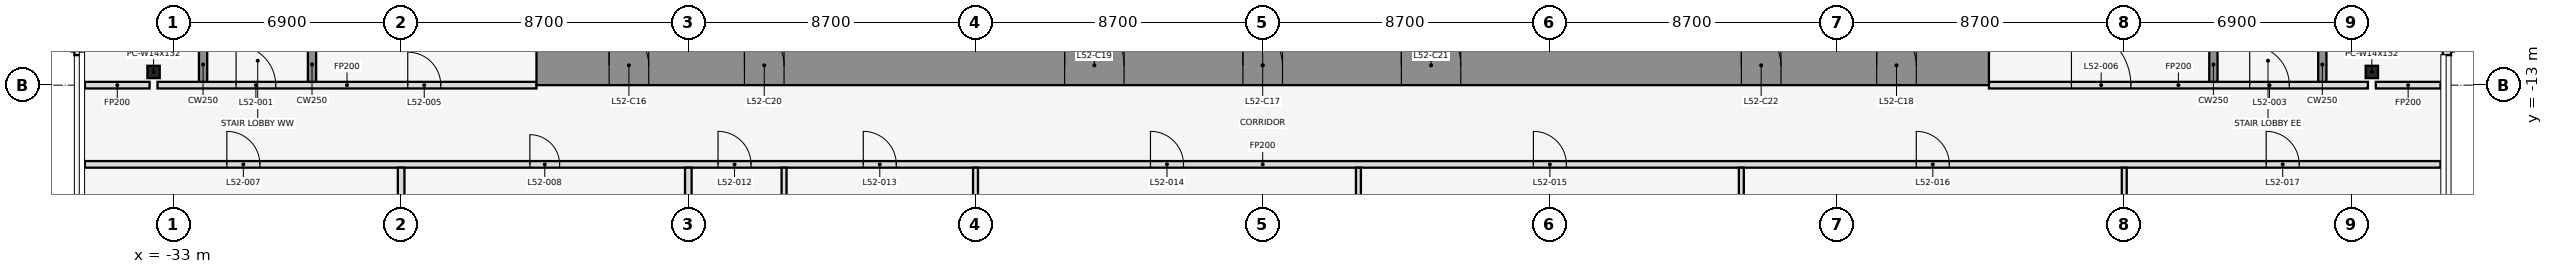
"""IFC4 building model, lengths in metres.
Left out: names, types, materials, properties, quantities, classifications, styles, units other than length and angle.
Written with IfcOpenShell. Run it as: python <this file> out.ifc"""

import sys

from ifc_helpers import new_model, si_unit, direction, frame, frame_2d, origin, origin_2d, place, context, subcontext, project, spatial, rectangle, i_section, extrude, element, fill, save


model = new_model("IFC4")
c1 = context("Model", 3, precision=1e-05, world=origin(), true_north=direction((0.0, 1.0)))
c2 = subcontext(c1, "Body", "Model", "MODEL_VIEW")
j1 = project(units=[si_unit("LENGTHUNIT", "METRE"), si_unit("PLANEANGLEUNIT", "RADIAN")], contexts=[c1])
p1 = place(None, origin())
s1 = spatial("IfcSite", under=j1, at=p1, CompositionType="ELEMENT")
p2 = place(p1, origin())
s2 = spatial("IfcBuilding", under=s1, at=p2, CompositionType="ELEMENT")
p3 = place(p2, frame((0.0, 0.0, 231.9)))
s3 = spatial("IfcBuildingStorey", under=s2, at=p3, CompositionType="ELEMENT", Elevation=231.9)
for number, where, z_axis, x_axis in (
    (1, (-33.6, -12.6, 0.0), (0.0, 0.0, 1.0), (1.0, 0.0, 0.0)),
    (2, (33.6, -12.6, 0.0), (0.0, 0.0, 1.0), (1.0, 0.0, 0.0)),
):
    element("IfcColumn", number, at=place(p3, frame(where, z_axis=z_axis, x_axis=x_axis)), inside=s3, PredefinedType="COLUMN", context=c2, shape_type="SweptSolid", body=[
        extrude(i_section(OverallWidth=0.373, OverallDepth=0.373, WebThickness=0.016, FlangeThickness=0.026, at=origin_2d()), origin(), (0.0, 0.0, 1.0), 4.1),
    ])
for number, where, z_axis, x_axis in (
    (3, (-35.875, -3.0, 0.0), (0.0, 0.0, 1.0), (0.0, -1.0, 0.0)),
    (4, (35.875, -12.09, 0.0), (0.0, 0.0, 1.0), (0.0, 1.0, 0.0)),
):
    element("IfcWall", number, at=place(p3, frame(where, z_axis=z_axis, x_axis=x_axis)), inside=s3, PredefinedType="STANDARD", context=c2, shape_type="SweptSolid", body=[
        extrude(rectangle(XDim=9.09, YDim=0.25, at=frame_2d((4.545, 0.0))), origin(), (0.0, 0.0, 1.0), 3.9),
    ])
p4 = place(p3, frame((-35.68, -15.4, 0.0), z_axis=(0.0, 0.0, 1.0), x_axis=(1.0, 0.0, 0.0)))
e5 = element("IfcWall", 5, at=p4, inside=s3, PredefinedType="PARTITIONING", context=c2, shape_type="SweptSolid", body=[
    extrude(rectangle(XDim=71.36, YDim=0.2, at=frame_2d((35.68, 0.0))), origin(), (0.0, 0.0, 1.0), 2.79),
])
p5 = place(p4, frame((4.3, 0.0, 0.0)))
e6 = element("IfcOpeningElement", 6, at=p5, cuts=e5, PredefinedType="OPENING", context=c2, shape_type="SweptSolid", body=[
    extrude(rectangle(XDim=1.0, YDim=2.1, at=frame_2d((0.5, 1.05))), frame((0.0, 0.112, 0.0), z_axis=(0.0, -1.0, 0.0), x_axis=(1.0, 0.0, 0.0)), (0.0, 0.0, 1.0), 0.224),
])
p6 = place(p4, frame((13.48, 0.0, 0.0)))
e7 = element("IfcOpeningElement", 7, at=p6, cuts=e5, PredefinedType="OPENING", context=c2, shape_type="SweptSolid", body=[
    extrude(rectangle(XDim=0.9, YDim=2.1, at=frame_2d((0.45, 1.05))), frame((0.0, 0.112, 0.0), z_axis=(0.0, -1.0, 0.0), x_axis=(1.0, 0.0, 0.0)), (0.0, 0.0, 1.0), 0.224),
])
p7 = place(p4, frame((19.18, 0.0, 0.0)))
e8 = element("IfcOpeningElement", 8, at=p7, cuts=e5, PredefinedType="OPENING", context=c2, shape_type="SweptSolid", body=[
    extrude(rectangle(XDim=1.0, YDim=2.1, at=frame_2d((0.5, 1.05))), frame((0.0, 0.112, 0.0), z_axis=(0.0, -1.0, 0.0), x_axis=(1.0, 0.0, 0.0)), (0.0, 0.0, 1.0), 0.224),
])
p8 = place(p4, frame((23.58, 0.0, 0.0)))
e9 = element("IfcOpeningElement", 9, at=p8, cuts=e5, PredefinedType="OPENING", context=c2, shape_type="SweptSolid", body=[
    extrude(rectangle(XDim=1.0, YDim=2.1, at=frame_2d((0.5, 1.05))), frame((0.0, 0.112, 0.0), z_axis=(0.0, -1.0, 0.0), x_axis=(1.0, 0.0, 0.0)), (0.0, 0.0, 1.0), 0.224),
])
p9 = place(p4, frame((32.28, 0.0, 0.0)))
e10 = element("IfcOpeningElement", 10, at=p9, cuts=e5, PredefinedType="OPENING", context=c2, shape_type="SweptSolid", body=[
    extrude(rectangle(XDim=1.0, YDim=2.1, at=frame_2d((0.5, 1.05))), frame((0.0, 0.112, 0.0), z_axis=(0.0, -1.0, 0.0), x_axis=(1.0, 0.0, 0.0)), (0.0, 0.0, 1.0), 0.224),
])
p10 = place(p4, frame((43.88, 0.0, 0.0)))
e11 = element("IfcOpeningElement", 11, at=p10, cuts=e5, PredefinedType="OPENING", context=c2, shape_type="SweptSolid", body=[
    extrude(rectangle(XDim=1.0, YDim=2.1, at=frame_2d((0.5, 1.05))), frame((0.0, 0.112, 0.0), z_axis=(0.0, -1.0, 0.0), x_axis=(1.0, 0.0, 0.0)), (0.0, 0.0, 1.0), 0.224),
])
p11 = place(p4, frame((55.48, 0.0, 0.0)))
e12 = element("IfcOpeningElement", 12, at=p11, cuts=e5, PredefinedType="OPENING", context=c2, shape_type="SweptSolid", body=[
    extrude(rectangle(XDim=1.0, YDim=2.1, at=frame_2d((0.5, 1.05))), frame((0.0, 0.112, 0.0), z_axis=(0.0, -1.0, 0.0), x_axis=(1.0, 0.0, 0.0)), (0.0, 0.0, 1.0), 0.224),
])
p12 = place(p4, frame((66.08, 0.0, 0.0)))
e13 = element("IfcOpeningElement", 13, at=p12, cuts=e5, PredefinedType="OPENING", context=c2, shape_type="SweptSolid", body=[
    extrude(rectangle(XDim=1.0, YDim=2.1, at=frame_2d((0.5, 1.05))), frame((0.0, 0.112, 0.0), z_axis=(0.0, -1.0, 0.0), x_axis=(1.0, 0.0, 0.0)), (0.0, 0.0, 1.0), 0.224),
])
p13 = place(p3, frame((-35.68, -13.0, 0.0), z_axis=(0.0, 0.0, 1.0), x_axis=(1.0, 0.0, 0.0)))
e14 = element("IfcWall", 14, at=p13, inside=s3, PredefinedType="PARTITIONING", context=c2, shape_type="SweptSolid", body=[
    extrude(rectangle(XDim=1.96, YDim=0.2, at=frame_2d((0.98, 0.0))), origin(), (0.0, 0.0, 1.0), 2.79),
])
p14 = place(p3, frame((-33.48, -13.0, 0.0), z_axis=(0.0, 0.0, 1.0), x_axis=(1.0, 0.0, 0.0)))
e15 = element("IfcWall", 15, at=p14, inside=s3, PredefinedType="PARTITIONING", context=c2, shape_type="SweptSolid", body=[
    extrude(rectangle(XDim=11.48, YDim=0.2, at=frame_2d((5.74, 0.0))), origin(), (0.0, 0.0, 1.0), 2.79),
])
p15 = place(p14, frame((2.38, 0.0, 0.0)))
e16 = element("IfcOpeningElement", 16, at=p15, cuts=e15, PredefinedType="OPENING", context=c2, shape_type="SweptSolid", body=[
    extrude(rectangle(XDim=1.2, YDim=2.1, at=frame_2d((0.6, 1.05))), frame((0.0, 0.112, 0.0), z_axis=(0.0, -1.0, 0.0), x_axis=(1.0, 0.0, 0.0)), (0.0, 0.0, 1.0), 0.224),
])
p16 = place(p14, frame((7.58, 0.0, 0.0)))
e17 = element("IfcOpeningElement", 17, at=p16, cuts=e15, PredefinedType="OPENING", context=c2, shape_type="SweptSolid", body=[
    extrude(rectangle(XDim=1.0, YDim=2.1, at=frame_2d((0.5, 1.05))), frame((0.0, 0.112, 0.0), z_axis=(0.0, -1.0, 0.0), x_axis=(1.0, 0.0, 0.0)), (0.0, 0.0, 1.0), 0.224),
])
p17 = place(p3, frame((22.0, -13.0, 0.0), z_axis=(0.0, 0.0, 1.0), x_axis=(1.0, 0.0, 0.0)))
e18 = element("IfcWall", 18, at=p17, inside=s3, PredefinedType="PARTITIONING", context=c2, shape_type="SweptSolid", body=[
    extrude(rectangle(XDim=11.48, YDim=0.2, at=frame_2d((5.74, 0.0))), origin(), (0.0, 0.0, 1.0), 2.79),
])
p18 = place(p17, frame((7.9, 0.0, 0.0)))
e19 = element("IfcOpeningElement", 19, at=p18, cuts=e18, PredefinedType="OPENING", context=c2, shape_type="SweptSolid", body=[
    extrude(rectangle(XDim=1.2, YDim=2.1, at=frame_2d((0.6, 1.05))), frame((0.0, 0.112, 0.0), z_axis=(0.0, -1.0, 0.0), x_axis=(1.0, 0.0, 0.0)), (0.0, 0.0, 1.0), 0.224),
])
p19 = place(p17, frame((2.5, 0.0, 0.0)))
e20 = element("IfcOpeningElement", 20, at=p19, cuts=e18, PredefinedType="OPENING", context=c2, shape_type="SweptSolid", body=[
    extrude(rectangle(XDim=1.8, YDim=2.1, at=frame_2d((0.9, 1.05))), frame((0.0, 0.112, 0.0), z_axis=(0.0, -1.0, 0.0), x_axis=(1.0, 0.0, 0.0)), (0.0, 0.0, 1.0), 0.224),
])
p20 = place(p3, frame((33.72, -13.0, 0.0), z_axis=(0.0, 0.0, 1.0), x_axis=(1.0, 0.0, 0.0)))
e21 = element("IfcWall", 21, at=p20, inside=s3, PredefinedType="PARTITIONING", context=c2, shape_type="SweptSolid", body=[
    extrude(rectangle(XDim=1.96, YDim=0.2, at=frame_2d((0.98, 0.0))), origin(), (0.0, 0.0, 1.0), 2.79),
])
for number, where, z_axis, x_axis in (
    (22, (-32.1, -12.9, 0.0), (0.0, 0.0, 1.0), (0.0, 1.0, 0.0)),
    (23, (-28.8, -12.9, 0.0), (0.0, 0.0, 1.0), (0.0, 1.0, 0.0)),
):
    element("IfcWall", number, at=place(p3, frame(where, z_axis=z_axis, x_axis=x_axis)), inside=s3, PredefinedType="SHEAR", context=c2, shape_type="SweptSolid", body=[
        extrude(rectangle(XDim=1.05, YDim=0.25, at=frame_2d((0.525, 0.0))), origin(), (0.0, 0.0, 1.0), 4.1),
    ])
p21 = place(p3, frame((-26.1, -30.57, 0.0), z_axis=(0.0, 0.0, 1.0), x_axis=(0.0, 1.0, 0.0)))
e24 = element("IfcWall", 24, at=p21, inside=s3, PredefinedType="PARTITIONING", context=c2, shape_type="SweptSolid", body=[
    extrude(rectangle(XDim=15.07, YDim=0.2, at=frame_2d((7.535, 0.0))), origin(), (0.0, 0.0, 1.0), 2.79),
])
p22 = place(p3, frame((-17.4, -21.725, 0.0), z_axis=(0.0, 0.0, 1.0), x_axis=(0.0, 1.0, 0.0)))
e25 = element("IfcWall", 25, at=p22, inside=s3, PredefinedType="PARTITIONING", context=c2, shape_type="SweptSolid", body=[
    extrude(rectangle(XDim=6.225, YDim=0.2, at=frame_2d((3.113, 0.0))), origin(), (0.0, 0.0, 1.0), 2.79),
])
p23 = place(p3, frame((-14.5, -29.048, 0.0), z_axis=(0.0, 0.0, 1.0), x_axis=(0.0, 1.0, 0.0)))
e26 = element("IfcWall", 26, at=p23, inside=s3, PredefinedType="PARTITIONING", context=c2, shape_type="SweptSolid", body=[
    extrude(rectangle(XDim=13.548, YDim=0.15, at=frame_2d((6.774, 0.0))), origin(), (0.0, 0.0, 1.0), 2.79),
])
p24 = place(p3, frame((-8.7, -30.886, 0.0), z_axis=(0.0, 0.0, 1.0), x_axis=(0.0, 1.0, 0.0)))
e27 = element("IfcWall", 27, at=p24, inside=s3, PredefinedType="PARTITIONING", context=c2, shape_type="SweptSolid", body=[
    extrude(rectangle(XDim=15.386, YDim=0.15, at=frame_2d((7.693, 0.0))), origin(), (0.0, 0.0, 1.0), 2.79),
])
p25 = place(p3, frame((2.9, -32.24, 0.0), z_axis=(0.0, 0.0, 1.0), x_axis=(0.0, 1.0, 0.0)))
e28 = element("IfcWall", 28, at=p25, inside=s3, PredefinedType="PARTITIONING", context=c2, shape_type="SweptSolid", body=[
    extrude(rectangle(XDim=16.74, YDim=0.15, at=frame_2d((8.37, 0.0))), origin(), (0.0, 0.0, 1.0), 2.79),
])
p26 = place(p3, frame((14.5, -29.048, 0.0), z_axis=(0.0, 0.0, 1.0), x_axis=(0.0, 1.0, 0.0)))
e29 = element("IfcWall", 29, at=p26, inside=s3, PredefinedType="PARTITIONING", context=c2, shape_type="SweptSolid", body=[
    extrude(rectangle(XDim=13.548, YDim=0.15, at=frame_2d((6.774, 0.0))), origin(), (0.0, 0.0, 1.0), 2.79),
])
p27 = place(p3, frame((26.1, -30.57, 0.0), z_axis=(0.0, 0.0, 1.0), x_axis=(0.0, 1.0, 0.0)))
e30 = element("IfcWall", 30, at=p27, inside=s3, PredefinedType="PARTITIONING", context=c2, shape_type="SweptSolid", body=[
    extrude(rectangle(XDim=15.07, YDim=0.15, at=frame_2d((7.535, 0.0))), origin(), (0.0, 0.0, 1.0), 2.79),
])
for number, where, z_axis, x_axis in (
    (31, (28.8, -12.9, 0.0), (0.0, 0.0, 1.0), (0.0, 1.0, 0.0)),
    (32, (32.1, -12.9, 0.0), (0.0, 0.0, 1.0), (0.0, 1.0, 0.0)),
):
    element("IfcWall", number, at=place(p3, frame(where, z_axis=z_axis, x_axis=x_axis)), inside=s3, PredefinedType="SHEAR", context=c2, shape_type="SweptSolid", body=[
        extrude(rectangle(XDim=1.05, YDim=0.25, at=frame_2d((0.525, 0.0))), origin(), (0.0, 0.0, 1.0), 4.1),
    ])
p28 = place(p3, frame((-22.0, -12.4, 0.0), z_axis=(0.0, 0.0, 1.0), x_axis=(1.0, 0.0, 0.0)))
e33 = element("IfcWall", 33, at=p28, inside=s3, PredefinedType="SHEAR", context=c2, shape_type="SweptSolid", body=[
    extrude(rectangle(XDim=44.0, YDim=1.2, at=frame_2d((22.0, 0.0))), origin(), (0.0, 0.0, 1.0), 4.1),
])
p29 = place(p28, frame((2.2, 0.0, 0.0)))
e34 = element("IfcOpeningElement", 34, at=p29, cuts=e33, PredefinedType="OPENING", context=c2, shape_type="SweptSolid", body=[
    extrude(rectangle(XDim=1.2, YDim=2.1, at=frame_2d((0.6, 1.05))), frame((0.0, 0.612, 0.0), z_axis=(0.0, -1.0, 0.0), x_axis=(1.0, 0.0, 0.0)), (0.0, 0.0, 1.0), 1.224),
])
p30 = place(p28, frame((21.4, 0.0, 0.0)))
e35 = element("IfcOpeningElement", 35, at=p30, cuts=e33, PredefinedType="OPENING", context=c2, shape_type="SweptSolid", body=[
    extrude(rectangle(XDim=1.2, YDim=2.1, at=frame_2d((0.6, 1.05))), frame((0.0, 0.612, 0.0), z_axis=(0.0, -1.0, 0.0), x_axis=(1.0, 0.0, 0.0)), (0.0, 0.0, 1.0), 1.224),
])
p31 = place(p28, frame((40.6, 0.0, 0.0)))
e36 = element("IfcOpeningElement", 36, at=p31, cuts=e33, PredefinedType="OPENING", context=c2, shape_type="SweptSolid", body=[
    extrude(rectangle(XDim=1.2, YDim=2.1, at=frame_2d((0.6, 1.05))), frame((0.0, 0.612, 0.0), z_axis=(0.0, -1.0, 0.0), x_axis=(1.0, 0.0, 0.0)), (0.0, 0.0, 1.0), 1.224),
])
p32 = place(p28, frame((16.0, 0.0, 0.0)))
e37 = element("IfcOpeningElement", 37, at=p32, cuts=e33, PredefinedType="OPENING", context=c2, shape_type="SweptSolid", body=[
    extrude(rectangle(XDim=1.8, YDim=2.1, at=frame_2d((0.9, 1.05))), frame((0.0, 0.612, 0.0), z_axis=(0.0, -1.0, 0.0), x_axis=(1.0, 0.0, 0.0)), (0.0, 0.0, 1.0), 1.224),
])
p33 = place(p28, frame((6.3, 0.0, 0.0)))
e38 = element("IfcOpeningElement", 38, at=p33, cuts=e33, PredefinedType="OPENING", context=c2, shape_type="SweptSolid", body=[
    extrude(rectangle(XDim=1.2, YDim=2.1, at=frame_2d((0.6, 1.05))), frame((0.0, 0.612, 0.0), z_axis=(0.0, -1.0, 0.0), x_axis=(1.0, 0.0, 0.0)), (0.0, 0.0, 1.0), 1.224),
])
p34 = place(p28, frame((26.2, 0.0, 0.0)))
e39 = element("IfcOpeningElement", 39, at=p34, cuts=e33, PredefinedType="OPENING", context=c2, shape_type="SweptSolid", body=[
    extrude(rectangle(XDim=1.8, YDim=2.1, at=frame_2d((0.9, 1.05))), frame((0.0, 0.612, 0.0), z_axis=(0.0, -1.0, 0.0), x_axis=(1.0, 0.0, 0.0)), (0.0, 0.0, 1.0), 1.224),
])
p35 = place(p28, frame((36.5, 0.0, 0.0)))
e40 = element("IfcOpeningElement", 40, at=p35, cuts=e33, PredefinedType="OPENING", context=c2, shape_type="SweptSolid", body=[
    extrude(rectangle(XDim=1.2, YDim=2.1, at=frame_2d((0.6, 1.05))), frame((0.0, 0.612, 0.0), z_axis=(0.0, -1.0, 0.0), x_axis=(1.0, 0.0, 0.0)), (0.0, 0.0, 1.0), 1.224),
])
p36 = place(p15, origin())
e41 = element("IfcDoor", 41, at=p36, inside=s3, OperationType="SINGLE_SWING_LEFT", PredefinedType="DOOR", context=c2, shape_type="SweptSolid", body=[
    extrude(rectangle(XDim=1.2, YDim=2.1, at=frame_2d((0.6, 1.05))), frame((0.0, 0.025, 0.0), z_axis=(0.0, -1.0, 0.0), x_axis=(1.0, 0.0, 0.0)), (0.0, 0.0, 1.0), 0.05),
])
fill(e16, e41)
p37 = place(p18, origin())
e42 = element("IfcDoor", 42, at=p37, inside=s3, OperationType="SINGLE_SWING_RIGHT", PredefinedType="DOOR", context=c2, shape_type="SweptSolid", body=[
    extrude(rectangle(XDim=1.2, YDim=2.1, at=frame_2d((0.6, 1.05))), frame((0.0, 0.025, 0.0), z_axis=(0.0, -1.0, 0.0), x_axis=(1.0, 0.0, 0.0)), (0.0, 0.0, 1.0), 0.05),
])
fill(e19, e42)
p38 = place(p16, origin())
e43 = element("IfcDoor", 43, at=p38, inside=s3, OperationType="SINGLE_SWING_LEFT", PredefinedType="DOOR", context=c2, shape_type="SweptSolid", body=[
    extrude(rectangle(XDim=1.0, YDim=2.1, at=frame_2d((0.5, 1.05))), frame((0.0, 0.025, 0.0), z_axis=(0.0, -1.0, 0.0), x_axis=(1.0, 0.0, 0.0)), (0.0, 0.0, 1.0), 0.05),
])
fill(e17, e43)
p39 = place(p19, origin())
e44 = element("IfcDoor", 44, at=p39, inside=s3, OperationType="SINGLE_SWING_LEFT", PredefinedType="DOOR", context=c2, shape_type="SweptSolid", body=[
    extrude(rectangle(XDim=1.8, YDim=2.1, at=frame_2d((0.9, 1.05))), frame((0.0, 0.025, 0.0), z_axis=(0.0, -1.0, 0.0), x_axis=(1.0, 0.0, 0.0)), (0.0, 0.0, 1.0), 0.05),
])
fill(e20, e44)
p40 = place(p5, frame((1.0, 0.0, 0.0), z_axis=(0.0, 0.0, 1.0), x_axis=(-1.0, 0.0, 0.0)))
e45 = element("IfcDoor", 45, at=p40, inside=s3, OperationType="SINGLE_SWING_LEFT", PredefinedType="DOOR", context=c2, shape_type="SweptSolid", body=[
    extrude(rectangle(XDim=1.0, YDim=2.1, at=frame_2d((0.5, 1.05))), frame((0.0, 0.025, 0.0), z_axis=(0.0, -1.0, 0.0), x_axis=(1.0, 0.0, 0.0)), (0.0, 0.0, 1.0), 0.05),
])
fill(e6, e45)
p41 = place(p6, frame((0.9, 0.0, 0.0), z_axis=(0.0, 0.0, 1.0), x_axis=(-1.0, 0.0, 0.0)))
e46 = element("IfcDoor", 46, at=p41, inside=s3, OperationType="SINGLE_SWING_RIGHT", PredefinedType="DOOR", context=c2, shape_type="SweptSolid", body=[
    extrude(rectangle(XDim=0.9, YDim=2.1, at=frame_2d((0.45, 1.05))), frame((0.0, 0.025, 0.0), z_axis=(0.0, -1.0, 0.0), x_axis=(1.0, 0.0, 0.0)), (0.0, 0.0, 1.0), 0.05),
])
fill(e7, e46)
p42 = place(p7, frame((1.0, 0.0, 0.0), z_axis=(0.0, 0.0, 1.0), x_axis=(-1.0, 0.0, 0.0)))
e47 = element("IfcDoor", 47, at=p42, inside=s3, OperationType="SINGLE_SWING_RIGHT", PredefinedType="DOOR", context=c2, shape_type="SweptSolid", body=[
    extrude(rectangle(XDim=1.0, YDim=2.1, at=frame_2d((0.5, 1.05))), frame((0.0, 0.025, 0.0), z_axis=(0.0, -1.0, 0.0), x_axis=(1.0, 0.0, 0.0)), (0.0, 0.0, 1.0), 0.05),
])
fill(e8, e47)
p43 = place(p8, frame((1.0, 0.0, 0.0), z_axis=(0.0, 0.0, 1.0), x_axis=(-1.0, 0.0, 0.0)))
e48 = element("IfcDoor", 48, at=p43, inside=s3, OperationType="SINGLE_SWING_LEFT", PredefinedType="DOOR", context=c2, shape_type="SweptSolid", body=[
    extrude(rectangle(XDim=1.0, YDim=2.1, at=frame_2d((0.5, 1.05))), frame((0.0, 0.025, 0.0), z_axis=(0.0, -1.0, 0.0), x_axis=(1.0, 0.0, 0.0)), (0.0, 0.0, 1.0), 0.05),
])
fill(e9, e48)
p44 = place(p9, frame((1.0, 0.0, 0.0), z_axis=(0.0, 0.0, 1.0), x_axis=(-1.0, 0.0, 0.0)))
e49 = element("IfcDoor", 49, at=p44, inside=s3, OperationType="SINGLE_SWING_RIGHT", PredefinedType="DOOR", context=c2, shape_type="SweptSolid", body=[
    extrude(rectangle(XDim=1.0, YDim=2.1, at=frame_2d((0.5, 1.05))), frame((0.0, 0.025, 0.0), z_axis=(0.0, -1.0, 0.0), x_axis=(1.0, 0.0, 0.0)), (0.0, 0.0, 1.0), 0.05),
])
fill(e10, e49)
p45 = place(p10, frame((1.0, 0.0, 0.0), z_axis=(0.0, 0.0, 1.0), x_axis=(-1.0, 0.0, 0.0)))
e50 = element("IfcDoor", 50, at=p45, inside=s3, OperationType="SINGLE_SWING_RIGHT", PredefinedType="DOOR", context=c2, shape_type="SweptSolid", body=[
    extrude(rectangle(XDim=1.0, YDim=2.1, at=frame_2d((0.5, 1.05))), frame((0.0, 0.025, 0.0), z_axis=(0.0, -1.0, 0.0), x_axis=(1.0, 0.0, 0.0)), (0.0, 0.0, 1.0), 0.05),
])
fill(e11, e50)
p46 = place(p11, frame((1.0, 0.0, 0.0), z_axis=(0.0, 0.0, 1.0), x_axis=(-1.0, 0.0, 0.0)))
e51 = element("IfcDoor", 51, at=p46, inside=s3, OperationType="SINGLE_SWING_LEFT", PredefinedType="DOOR", context=c2, shape_type="SweptSolid", body=[
    extrude(rectangle(XDim=1.0, YDim=2.1, at=frame_2d((0.5, 1.05))), frame((0.0, 0.025, 0.0), z_axis=(0.0, -1.0, 0.0), x_axis=(1.0, 0.0, 0.0)), (0.0, 0.0, 1.0), 0.05),
])
fill(e12, e51)
p47 = place(p12, frame((1.0, 0.0, 0.0), z_axis=(0.0, 0.0, 1.0), x_axis=(-1.0, 0.0, 0.0)))
e52 = element("IfcDoor", 52, at=p47, inside=s3, OperationType="SINGLE_SWING_RIGHT", PredefinedType="DOOR", context=c2, shape_type="SweptSolid", body=[
    extrude(rectangle(XDim=1.0, YDim=2.1, at=frame_2d((0.5, 1.05))), frame((0.0, 0.025, 0.0), z_axis=(0.0, -1.0, 0.0), x_axis=(1.0, 0.0, 0.0)), (0.0, 0.0, 1.0), 0.05),
])
fill(e13, e52)
p48 = place(p29, frame((1.2, 0.0, 0.0), z_axis=(0.0, 0.0, 1.0), x_axis=(-1.0, 0.0, 0.0)))
e53 = element("IfcDoor", 53, at=p48, inside=s3, OperationType="SINGLE_SWING_RIGHT", PredefinedType="DOOR", context=c2, shape_type="SweptSolid", body=[
    extrude(rectangle(XDim=1.2, YDim=2.1, at=frame_2d((0.6, 1.05))), frame((0.0, 0.025, 0.0), z_axis=(0.0, -1.0, 0.0), x_axis=(1.0, 0.0, 0.0)), (0.0, 0.0, 1.0), 0.05),
])
fill(e34, e53)
p49 = place(p30, frame((1.2, 0.0, 0.0), z_axis=(0.0, 0.0, 1.0), x_axis=(-1.0, 0.0, 0.0)))
e54 = element("IfcDoor", 54, at=p49, inside=s3, OperationType="SINGLE_SWING_RIGHT", PredefinedType="DOOR", context=c2, shape_type="SweptSolid", body=[
    extrude(rectangle(XDim=1.2, YDim=2.1, at=frame_2d((0.6, 1.05))), frame((0.0, 0.025, 0.0), z_axis=(0.0, -1.0, 0.0), x_axis=(1.0, 0.0, 0.0)), (0.0, 0.0, 1.0), 0.05),
])
fill(e35, e54)
p50 = place(p31, frame((1.2, 0.0, 0.0), z_axis=(0.0, 0.0, 1.0), x_axis=(-1.0, 0.0, 0.0)))
e55 = element("IfcDoor", 55, at=p50, inside=s3, OperationType="SINGLE_SWING_RIGHT", PredefinedType="DOOR", context=c2, shape_type="SweptSolid", body=[
    extrude(rectangle(XDim=1.2, YDim=2.1, at=frame_2d((0.6, 1.05))), frame((0.0, 0.025, 0.0), z_axis=(0.0, -1.0, 0.0), x_axis=(1.0, 0.0, 0.0)), (0.0, 0.0, 1.0), 0.05),
])
fill(e36, e55)
p51 = place(p32, origin())
e56 = element("IfcDoor", 56, at=p51, inside=s3, OperationType="SINGLE_SWING_LEFT", PredefinedType="DOOR", context=c2, shape_type="SweptSolid", body=[
    extrude(rectangle(XDim=1.8, YDim=2.1, at=frame_2d((0.9, 1.05))), frame((0.0, 0.025, 0.0), z_axis=(0.0, -1.0, 0.0), x_axis=(1.0, 0.0, 0.0)), (0.0, 0.0, 1.0), 0.05),
])
fill(e37, e56)
p52 = place(p33, frame((1.2, 0.0, 0.0), z_axis=(0.0, 0.0, 1.0), x_axis=(-1.0, 0.0, 0.0)))
e57 = element("IfcDoor", 57, at=p52, inside=s3, OperationType="SINGLE_SWING_RIGHT", PredefinedType="DOOR", context=c2, shape_type="SweptSolid", body=[
    extrude(rectangle(XDim=1.2, YDim=2.1, at=frame_2d((0.6, 1.05))), frame((0.0, 0.025, 0.0), z_axis=(0.0, -1.0, 0.0), x_axis=(1.0, 0.0, 0.0)), (0.0, 0.0, 1.0), 0.05),
])
fill(e38, e57)
p53 = place(p34, origin())
e58 = element("IfcDoor", 58, at=p53, inside=s3, OperationType="SINGLE_SWING_LEFT", PredefinedType="DOOR", context=c2, shape_type="SweptSolid", body=[
    extrude(rectangle(XDim=1.8, YDim=2.1, at=frame_2d((0.9, 1.05))), frame((0.0, 0.025, 0.0), z_axis=(0.0, -1.0, 0.0), x_axis=(1.0, 0.0, 0.0)), (0.0, 0.0, 1.0), 0.05),
])
fill(e39, e58)
p54 = place(p35, frame((1.2, 0.0, 0.0), z_axis=(0.0, 0.0, 1.0), x_axis=(-1.0, 0.0, 0.0)))
e59 = element("IfcDoor", 59, at=p54, inside=s3, OperationType="SINGLE_SWING_RIGHT", PredefinedType="DOOR", context=c2, shape_type="SweptSolid", body=[
    extrude(rectangle(XDim=1.2, YDim=2.1, at=frame_2d((0.6, 1.05))), frame((0.0, 0.025, 0.0), z_axis=(0.0, -1.0, 0.0), x_axis=(1.0, 0.0, 0.0)), (0.0, 0.0, 1.0), 0.05),
])
fill(e40, e59)
save(model, sys.argv[1])
